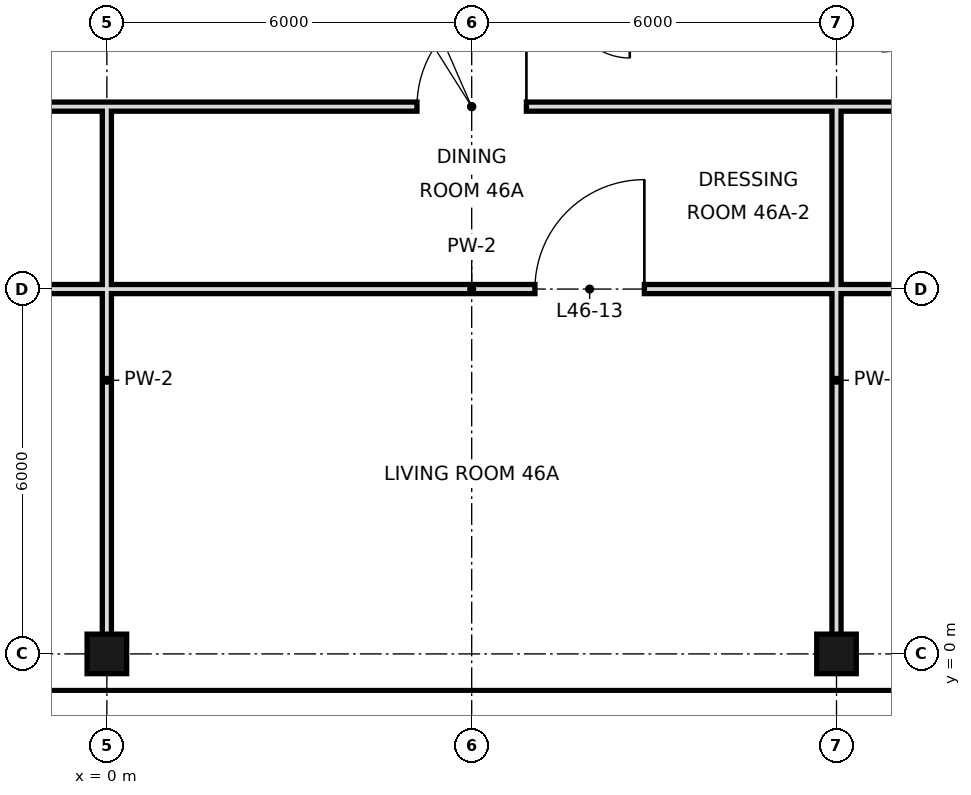
"""IFC4 building model, lengths in metres.
Left out: names, types, materials, properties, quantities, classifications, styles, units other than length and angle.
Written with IfcOpenShell. Run it as: python <this file> out.ifc"""

import sys

from ifc_helpers import new_model, si_unit, direction, frame, frame_2d, origin, origin_2d, place, context, subcontext, project, spatial, rectangle, hollow_rectangle, extrude, element, fill, save


model = new_model("IFC4")
c1 = context("Model", 3, precision=1e-05, world=origin(), true_north=direction((0.0, 1.0)))
c2 = subcontext(c1, "Body", "Model", "MODEL_VIEW")
j1 = project(units=[si_unit("LENGTHUNIT", "METRE"), si_unit("PLANEANGLEUNIT", "RADIAN")], contexts=[c1])
p1 = place(None, origin())
s1 = spatial("IfcSite", under=j1, at=p1, CompositionType="ELEMENT")
p2 = place(p1, origin())
s2 = spatial("IfcBuilding", under=s1, at=p2, CompositionType="ELEMENT")
p3 = place(p2, frame((0.0, 0.0, 199.2)))
s3 = spatial("IfcBuildingStorey", under=s2, at=p3, CompositionType="ELEMENT", Elevation=199.2)
for number, where, z_axis, x_axis in (
    (1, (0.0, 0.0, 0.0), (0.0, 0.0, 1.0), (1.0, 0.0, 0.0)),
    (2, (12.0, 0.0, 0.0), (0.0, 0.0, 1.0), (1.0, 0.0, 0.0)),
):
    element("IfcColumn", number, at=place(p3, frame(where, z_axis=z_axis, x_axis=x_axis)), inside=s3, PredefinedType="COLUMN", context=c2, shape_type="SweptSolid", body=[
        extrude(hollow_rectangle(XDim=0.65, YDim=0.65, WallThickness=0.032, at=origin_2d()), origin(), (0.0, 0.0, 1.0), 3.6),
    ])
for number, where, z_axis, x_axis in (
    (3, (0.0, 0.0, 0.0), (0.0, 0.0, 1.0), (0.0, 1.0, 0.0)),
    (4, (12.0, 0.0, 0.0), (0.0, 0.0, 1.0), (0.0, 1.0, 0.0)),
):
    element("IfcWall", number, at=place(p3, frame(where, z_axis=z_axis, x_axis=x_axis)), inside=s3, PredefinedType="PARTITIONING", context=c2, shape_type="SweptSolid", body=[
        extrude(rectangle(XDim=9.0, YDim=0.15, at=frame_2d((4.5, 0.0))), origin(), (0.0, 0.0, 1.0), 2.72),
    ])
p4 = place(p3, frame((-3.6, 6.0, 0.0), z_axis=(0.0, 0.0, 1.0), x_axis=(1.0, 0.0, 0.0)))
e5 = element("IfcWall", 5, at=p4, inside=s3, PredefinedType="PARTITIONING", context=c2, shape_type="SweptSolid", body=[
    extrude(rectangle(XDim=19.2, YDim=0.15, at=frame_2d((9.6, 0.0))), origin(), (0.0, 0.0, 1.0), 2.72),
])
p5 = place(p4, frame((1.3, 0.0, 0.0)))
e6 = element("IfcOpeningElement", 6, at=p5, cuts=e5, PredefinedType="OPENING", context=c2, shape_type="SweptSolid", body=[
    extrude(rectangle(XDim=1.0, YDim=2.4, at=frame_2d((0.5, 1.2))), frame((0.0, 0.085, 0.0), z_axis=(0.0, -1.0, 0.0), x_axis=(1.0, 0.0, 0.0)), (0.0, 0.0, 1.0), 0.17),
])
p6 = place(p4, frame((10.64, 0.0, 0.0)))
e7 = element("IfcOpeningElement", 7, at=p6, cuts=e5, PredefinedType="OPENING", context=c2, shape_type="SweptSolid", body=[
    extrude(rectangle(XDim=1.8, YDim=2.4, at=frame_2d((0.9, 1.2))), frame((0.0, 0.085, 0.0), z_axis=(0.0, -1.0, 0.0), x_axis=(1.0, 0.0, 0.0)), (0.0, 0.0, 1.0), 0.17),
])
p7 = place(p4, frame((17.32, 0.0, 0.0)))
e8 = element("IfcOpeningElement", 8, at=p7, cuts=e5, PredefinedType="OPENING", context=c2, shape_type="SweptSolid", body=[
    extrude(rectangle(XDim=1.0, YDim=2.4, at=frame_2d((0.5, 1.2))), frame((0.0, 0.085, 0.0), z_axis=(0.0, -1.0, 0.0), x_axis=(1.0, 0.0, 0.0)), (0.0, 0.0, 1.0), 0.17),
])
p8 = place(p3, frame((-3.6, 9.0, 0.0), z_axis=(0.0, 0.0, 1.0), x_axis=(1.0, 0.0, 0.0)))
e9 = element("IfcWall", 9, at=p8, inside=s3, PredefinedType="PARTITIONING", context=c2, shape_type="SweptSolid", body=[
    extrude(rectangle(XDim=19.2, YDim=0.15, at=frame_2d((9.6, 0.0))), origin(), (0.0, 0.0, 1.0), 3.42),
])
p9 = place(p8, frame((0.88, 0.0, 0.0)))
e10 = element("IfcOpeningElement", 10, at=p9, cuts=e9, PredefinedType="OPENING", context=c2, shape_type="SweptSolid", body=[
    extrude(rectangle(XDim=1.0, YDim=2.4, at=frame_2d((0.5, 1.2))), frame((0.0, 0.085, 0.0), z_axis=(0.0, -1.0, 0.0), x_axis=(1.0, 0.0, 0.0)), (0.0, 0.0, 1.0), 0.17),
])
p10 = place(p8, frame((8.7, 0.0, 0.0)))
e11 = element("IfcOpeningElement", 11, at=p10, cuts=e9, PredefinedType="OPENING", context=c2, shape_type="SweptSolid", body=[
    extrude(rectangle(XDim=1.8, YDim=2.4, at=frame_2d((0.9, 1.2))), frame((0.0, 0.085, 0.0), z_axis=(0.0, -1.0, 0.0), x_axis=(1.0, 0.0, 0.0)), (0.0, 0.0, 1.0), 0.17),
])
p11 = place(p8, frame((16.9, 0.0, 0.0)))
e12 = element("IfcOpeningElement", 12, at=p11, cuts=e9, PredefinedType="OPENING", context=c2, shape_type="SweptSolid", body=[
    extrude(rectangle(XDim=1.0, YDim=2.4, at=frame_2d((0.5, 1.2))), frame((0.0, 0.085, 0.0), z_axis=(0.0, -1.0, 0.0), x_axis=(1.0, 0.0, 0.0)), (0.0, 0.0, 1.0), 0.17),
])
p12 = place(p10, frame((1.8, 0.0, 0.0), z_axis=(0.0, 0.0, 1.0), x_axis=(-1.0, 0.0, 0.0)))
e13 = element("IfcDoor", 13, at=p12, inside=s3, OperationType="SINGLE_SWING_LEFT", PredefinedType="DOOR", context=c2, shape_type="SweptSolid", body=[
    extrude(rectangle(XDim=1.8, YDim=2.4, at=frame_2d((0.9, 1.2))), frame((0.0, 0.025, 0.0), z_axis=(0.0, -1.0, 0.0), x_axis=(1.0, 0.0, 0.0)), (0.0, 0.0, 1.0), 0.05),
])
fill(e11, e13)
p13 = place(p6, frame((1.8, 0.0, 0.0), z_axis=(0.0, 0.0, 1.0), x_axis=(-1.0, 0.0, 0.0)))
e14 = element("IfcDoor", 14, at=p13, inside=s3, OperationType="SINGLE_SWING_LEFT", PredefinedType="DOOR", context=c2, shape_type="SweptSolid", body=[
    extrude(rectangle(XDim=1.8, YDim=2.4, at=frame_2d((0.9, 1.2))), frame((0.0, 0.025, 0.0), z_axis=(0.0, -1.0, 0.0), x_axis=(1.0, 0.0, 0.0)), (0.0, 0.0, 1.0), 0.05),
])
fill(e7, e14)
save(model, sys.argv[1])
